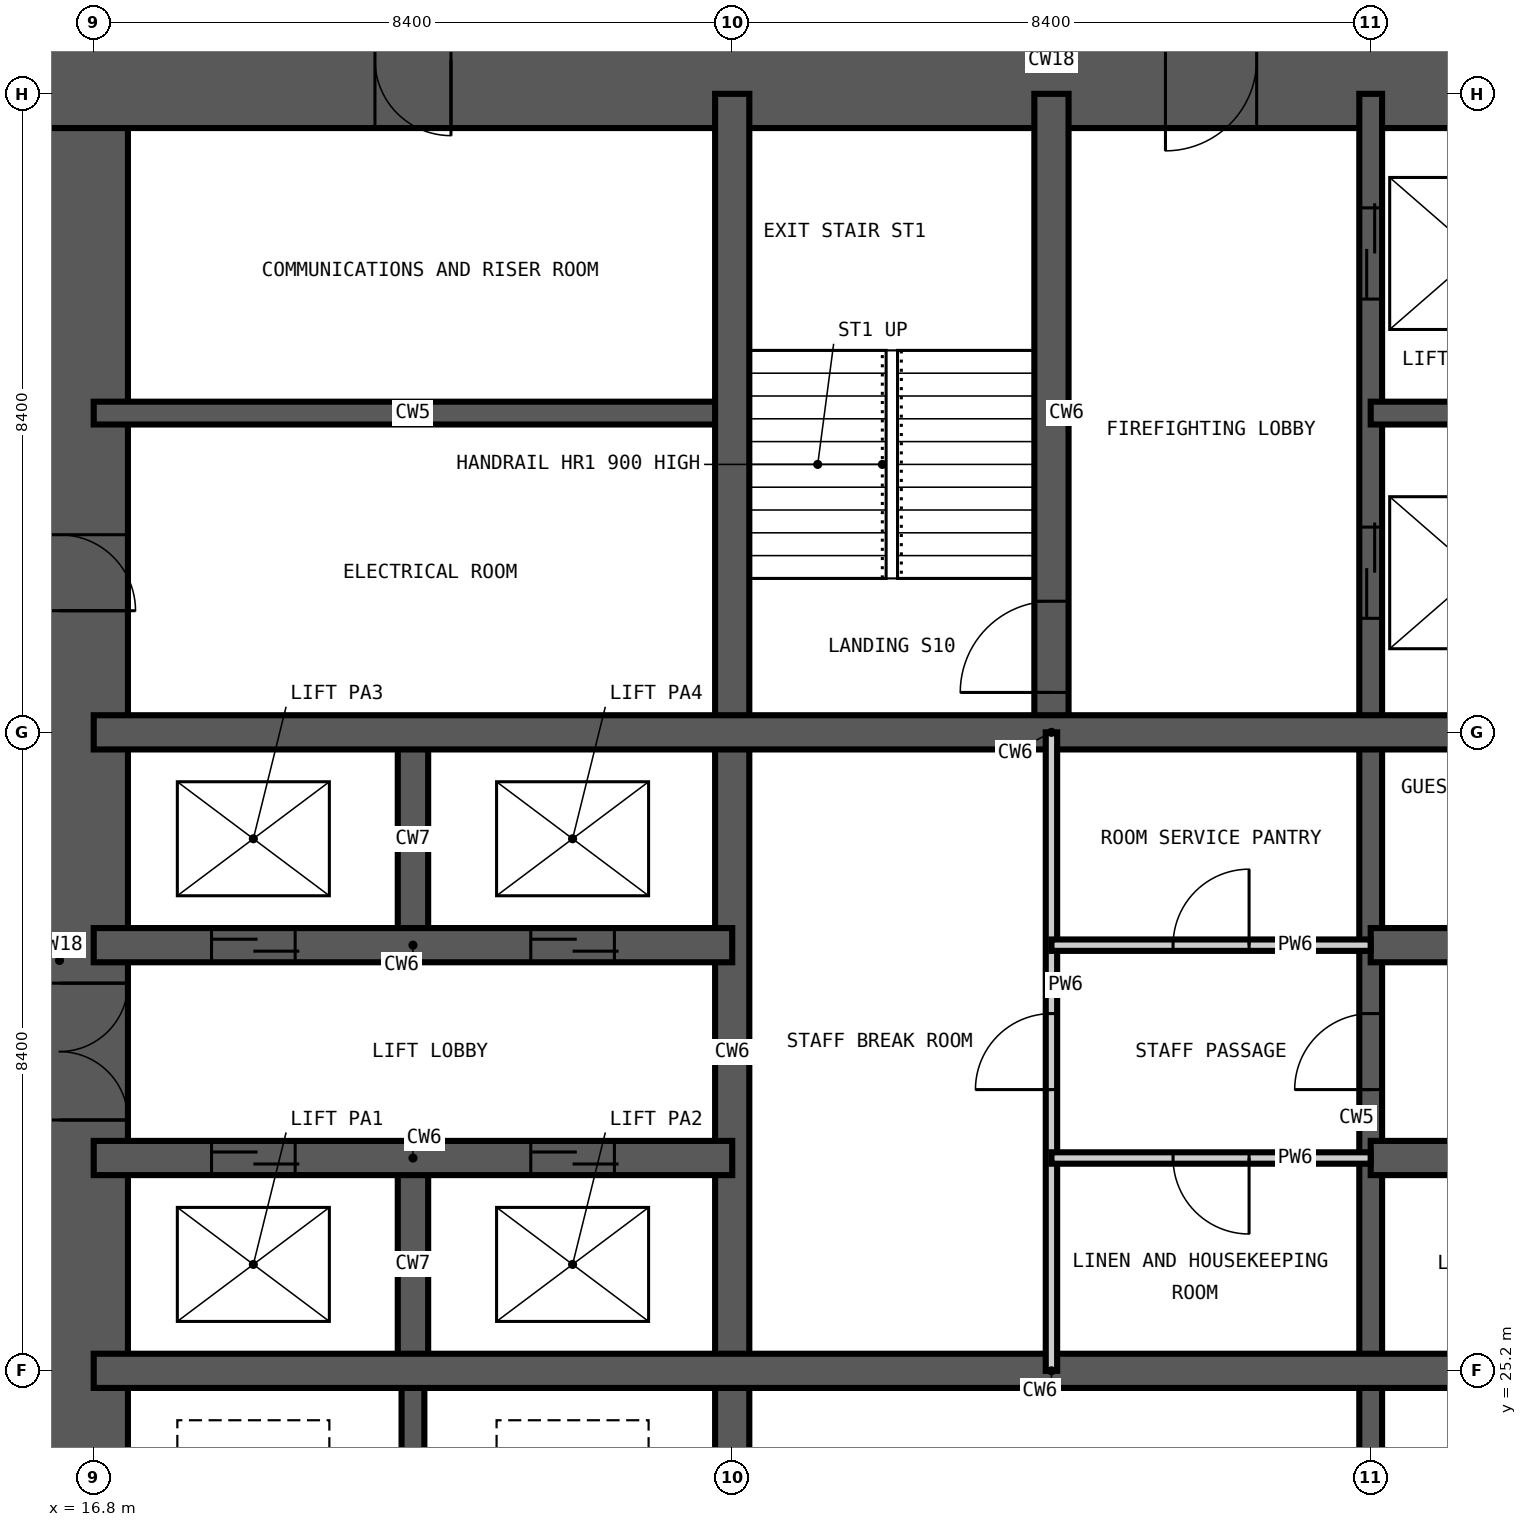
"""IFC4 building model, lengths in metres.
Left out: names, types, materials, properties, quantities, classifications, styles, units other than length and angle.
Written with IfcOpenShell. Run it as: python <this file> out.ifc"""

import sys

from ifc_helpers import new_model, si_unit, direction, frame, frame_2d, origin, place, context, subcontext, project, spatial, rectangle, extrude, element, fill, save


model = new_model("IFC4")
c1 = context("Model", 3, precision=1e-05, world=origin(), true_north=direction((0.0, 1.0)))
c2 = subcontext(c1, "Body", "Model", "MODEL_VIEW")
j1 = project(units=[si_unit("LENGTHUNIT", "METRE"), si_unit("PLANEANGLEUNIT", "RADIAN")], contexts=[c1])
p1 = place(None, origin())
s1 = spatial("IfcSite", under=j1, at=p1, CompositionType="ELEMENT")
p2 = place(p1, origin())
s2 = spatial("IfcBuilding", under=s1, at=p2, CompositionType="ELEMENT")
p3 = place(p2, frame((0.0, 0.0, 34.2)))
s3 = spatial("IfcBuildingStorey", under=s2, at=p3, CompositionType="ELEMENT", Elevation=34.2)
p4 = place(p3, frame((43.35, 42.45, -0.35), z_axis=(0.0, 0.0, 1.0), x_axis=(-1.0, 0.0, 0.0)))
e1 = element("IfcWall", 1, at=p4, inside=s3, PredefinedType="SHEAR", context=c2, shape_type="SweptSolid", body=[
    extrude(rectangle(XDim=27.9, YDim=1.8, at=frame_2d((13.95, 0.0))), origin(), (0.0, 0.0, 1.0), 3.6),
])
p5 = place(p4, frame((21.85, 0.0, 0.35)))
e2 = element("IfcOpeningElement", 2, at=p5, cuts=e1, PredefinedType="OPENING", context=c2, shape_type="SweptSolid", body=[
    extrude(rectangle(XDim=1.0, YDim=2.1, at=frame_2d((0.5, 1.05))), frame((0.0, 0.91, 0.0), z_axis=(0.0, -1.0, 0.0), x_axis=(1.0, 0.0, 0.0)), (0.0, 0.0, 1.0), 1.82),
])
p6 = place(p4, frame((11.25, 0.0, 0.35)))
e3 = element("IfcOpeningElement", 3, at=p6, cuts=e1, PredefinedType="OPENING", context=c2, shape_type="SweptSolid", body=[
    extrude(rectangle(XDim=1.2, YDim=2.2, at=frame_2d((0.6, 1.1))), frame((0.0, 0.91, 0.0), z_axis=(0.0, -1.0, 0.0), x_axis=(1.0, 0.0, 0.0)), (0.0, 0.0, 1.0), 1.82),
])
p7 = place(p3, frame((16.35, 41.55, -0.35), z_axis=(0.0, 0.0, 1.0), x_axis=(0.0, -1.0, 0.0)))
e4 = element("IfcWall", 4, at=p7, inside=s3, PredefinedType="SHEAR", context=c2, shape_type="SweptSolid", body=[
    extrude(rectangle(XDim=24.3, YDim=1.8, at=frame_2d((12.15, 0.0))), origin(), (0.0, 0.0, 1.0), 3.6),
])
p8 = place(p7, frame((11.25, 0.0, 0.35)))
e5 = element("IfcOpeningElement", 5, at=p8, cuts=e4, PredefinedType="OPENING", context=c2, shape_type="SweptSolid", body=[
    extrude(rectangle(XDim=1.8, YDim=2.2, at=frame_2d((0.9, 1.1))), frame((0.0, 0.91, 0.0), z_axis=(0.0, -1.0, 0.0), x_axis=(1.0, 0.0, 0.0)), (0.0, 0.0, 1.0), 1.82),
])
p9 = place(p7, frame((20.05, 0.0, 0.35)))
e6 = element("IfcOpeningElement", 6, at=p9, cuts=e4, PredefinedType="OPENING", context=c2, shape_type="SweptSolid", body=[
    extrude(rectangle(XDim=1.0, YDim=2.1, at=frame_2d((0.5, 1.05))), frame((0.0, 0.91, 0.0), z_axis=(0.0, -1.0, 0.0), x_axis=(1.0, 0.0, 0.0)), (0.0, 0.0, 1.0), 1.82),
])
p10 = place(p7, frame((5.35, 0.0, 0.35)))
e7 = element("IfcOpeningElement", 7, at=p10, cuts=e4, PredefinedType="OPENING", context=c2, shape_type="SweptSolid", body=[
    extrude(rectangle(XDim=1.0, YDim=2.1, at=frame_2d((0.5, 1.05))), frame((0.0, 0.91, 0.0), z_axis=(0.0, -1.0, 0.0), x_axis=(1.0, 0.0, 0.0)), (0.0, 0.0, 1.0), 1.82),
])
p11 = place(p3, frame((21.0, 22.4, -0.35), z_axis=(0.0, 0.0, 1.0), x_axis=(0.0, 1.0, 0.0)))
e8 = element("IfcWall", 8, at=p11, inside=s3, PredefinedType="SHEAR", context=c2, shape_type="SweptSolid", body=[
    extrude(rectangle(XDim=2.8, YDim=0.3, at=frame_2d((1.4, 0.0))), origin(), (0.0, 0.0, 1.0), 3.6),
])
p12 = place(p3, frame((33.6, 16.8, -0.35), z_axis=(0.0, 0.0, 1.0), x_axis=(0.0, 1.0, 0.0)))
e9 = element("IfcWall", 9, at=p12, inside=s3, PredefinedType="SHEAR", context=c2, shape_type="SweptSolid", body=[
    extrude(rectangle(XDim=25.2, YDim=0.3, at=frame_2d((12.6, 0.0))), origin(), (0.0, 0.0, 1.0), 3.6),
])
p13 = place(p12, frame((22.5, 0.0, 0.35)))
e10 = element("IfcOpeningElement", 10, at=p13, cuts=e9, PredefinedType="OPENING", context=c2, shape_type="SweptSolid", body=[
    extrude(rectangle(XDim=1.2, YDim=2.2, at=frame_2d((0.6, 1.1))), frame((0.0, 0.16, 0.0), z_axis=(0.0, -1.0, 0.0), x_axis=(1.0, 0.0, 0.0)), (0.0, 0.0, 1.0), 0.32),
])
p14 = place(p12, frame((18.3, 0.0, 0.35)))
e11 = element("IfcOpeningElement", 11, at=p14, cuts=e9, PredefinedType="OPENING", context=c2, shape_type="SweptSolid", body=[
    extrude(rectangle(XDim=1.2, YDim=2.2, at=frame_2d((0.6, 1.1))), frame((0.0, 0.16, 0.0), z_axis=(0.0, -1.0, 0.0), x_axis=(1.0, 0.0, 0.0)), (0.0, 0.0, 1.0), 0.32),
])
p15 = place(p12, frame((12.1, 0.0, 0.35)))
e12 = element("IfcOpeningElement", 12, at=p15, cuts=e9, PredefinedType="OPENING", context=c2, shape_type="SweptSolid", body=[
    extrude(rectangle(XDim=1.0, YDim=2.1, at=frame_2d((0.5, 1.05))), frame((0.0, 0.16, 0.0), z_axis=(0.0, -1.0, 0.0), x_axis=(1.0, 0.0, 0.0)), (0.0, 0.0, 1.0), 0.32),
])
p16 = place(p3, frame((16.8, 37.8, -0.35), z_axis=(0.0, 0.0, 1.0), x_axis=(1.0, 0.0, 0.0)))
e13 = element("IfcWall", 13, at=p16, inside=s3, PredefinedType="SHEAR", context=c2, shape_type="SweptSolid", body=[
    extrude(rectangle(XDim=8.4, YDim=0.3, at=frame_2d((4.2, 0.0))), origin(), (0.0, 0.0, 1.0), 3.6),
])
p17 = place(p3, frame((33.6, 37.8, -0.35), z_axis=(0.0, 0.0, 1.0), x_axis=(1.0, 0.0, 0.0)))
e14 = element("IfcWall", 14, at=p17, inside=s3, PredefinedType="SHEAR", context=c2, shape_type="SweptSolid", body=[
    extrude(rectangle(XDim=2.8, YDim=0.3, at=frame_2d((1.4, 0.0))), origin(), (0.0, 0.0, 1.0), 3.6),
])
for number, where, z_axis, x_axis in (
    (15, (21.0, 25.2, -0.35), (0.0, 0.0, 1.0), (0.0, 1.0, 0.0)),
    (16, (21.0, 30.8, -0.35), (0.0, 0.0, 1.0), (0.0, 1.0, 0.0)),
):
    element("IfcWall", number, at=place(p3, frame(where, z_axis=z_axis, x_axis=x_axis)), inside=s3, PredefinedType="SHEAR", context=c2, shape_type="SweptSolid", body=[
        extrude(rectangle(XDim=2.8, YDim=0.4, at=frame_2d((1.4, 0.0))), origin(), (0.0, 0.0, 1.0), 3.6),
    ])
p18 = place(p3, frame((25.2, 16.8, -0.35), z_axis=(0.0, 0.0, 1.0), x_axis=(0.0, 1.0, 0.0)))
e17 = element("IfcWall", 17, at=p18, inside=s3, PredefinedType="SHEAR", context=c2, shape_type="SweptSolid", body=[
    extrude(rectangle(XDim=25.2, YDim=0.45, at=frame_2d((12.6, 0.0))), origin(), (0.0, 0.0, 1.0), 3.6),
])
p19 = place(p3, frame((29.4, 33.6, -0.35), z_axis=(0.0, 0.0, 1.0), x_axis=(0.0, 1.0, 0.0)))
e18 = element("IfcWall", 18, at=p19, inside=s3, PredefinedType="SHEAR", context=c2, shape_type="SweptSolid", body=[
    extrude(rectangle(XDim=8.4, YDim=0.45, at=frame_2d((4.2, 0.0))), origin(), (0.0, 0.0, 1.0), 3.6),
])
p20 = place(p19, frame((0.525, 0.0, 0.35)))
e19 = element("IfcOpeningElement", 19, at=p20, cuts=e18, PredefinedType="OPENING", context=c2, shape_type="SweptSolid", body=[
    extrude(rectangle(XDim=1.2, YDim=2.2, at=frame_2d((0.6, 1.1))), frame((0.0, 0.235, 0.0), z_axis=(0.0, -1.0, 0.0), x_axis=(1.0, 0.0, 0.0)), (0.0, 0.0, 1.0), 0.47),
])
p21 = place(p3, frame((16.8, 25.2, -0.35), z_axis=(0.0, 0.0, 1.0), x_axis=(1.0, 0.0, 0.0)))
e20 = element("IfcWall", 20, at=p21, inside=s3, PredefinedType="SHEAR", context=c2, shape_type="SweptSolid", body=[
    extrude(rectangle(XDim=25.2, YDim=0.45, at=frame_2d((12.6, 0.0))), origin(), (0.0, 0.0, 1.0), 3.6),
])
p22 = place(p3, frame((16.8, 28.0, -0.35), z_axis=(0.0, 0.0, 1.0), x_axis=(1.0, 0.0, 0.0)))
e21 = element("IfcWall", 21, at=p22, inside=s3, PredefinedType="SHEAR", context=c2, shape_type="SweptSolid", body=[
    extrude(rectangle(XDim=8.4, YDim=0.45, at=frame_2d((4.2, 0.0))), origin(), (0.0, 0.0, 1.0), 3.6),
])
p23 = place(p22, frame((1.55, 0.0, 0.35)))
e22 = element("IfcOpeningElement", 22, at=p23, cuts=e21, PredefinedType="OPENING", context=c2, shape_type="SweptSolid", body=[
    extrude(rectangle(XDim=1.1, YDim=2.2, at=frame_2d((0.55, 1.1))), frame((0.0, 0.235, 0.0), z_axis=(0.0, -1.0, 0.0), x_axis=(1.0, 0.0, 0.0)), (0.0, 0.0, 1.0), 0.47),
])
p24 = place(p22, frame((5.75, 0.0, 0.35)))
e23 = element("IfcOpeningElement", 23, at=p24, cuts=e21, PredefinedType="OPENING", context=c2, shape_type="SweptSolid", body=[
    extrude(rectangle(XDim=1.1, YDim=2.2, at=frame_2d((0.55, 1.1))), frame((0.0, 0.235, 0.0), z_axis=(0.0, -1.0, 0.0), x_axis=(1.0, 0.0, 0.0)), (0.0, 0.0, 1.0), 0.47),
])
p25 = place(p3, frame((33.6, 28.0, -0.35), z_axis=(0.0, 0.0, 1.0), x_axis=(1.0, 0.0, 0.0)))
e24 = element("IfcWall", 24, at=p25, inside=s3, PredefinedType="SHEAR", context=c2, shape_type="SweptSolid", body=[
    extrude(rectangle(XDim=8.4, YDim=0.45, at=frame_2d((4.2, 0.0))), origin(), (0.0, 0.0, 1.0), 3.6),
])
p26 = place(p3, frame((16.8, 30.8, -0.35), z_axis=(0.0, 0.0, 1.0), x_axis=(1.0, 0.0, 0.0)))
e25 = element("IfcWall", 25, at=p26, inside=s3, PredefinedType="SHEAR", context=c2, shape_type="SweptSolid", body=[
    extrude(rectangle(XDim=8.4, YDim=0.45, at=frame_2d((4.2, 0.0))), origin(), (0.0, 0.0, 1.0), 3.6),
])
p27 = place(p26, frame((1.55, 0.0, 0.35)))
e26 = element("IfcOpeningElement", 26, at=p27, cuts=e25, PredefinedType="OPENING", context=c2, shape_type="SweptSolid", body=[
    extrude(rectangle(XDim=1.1, YDim=2.2, at=frame_2d((0.55, 1.1))), frame((0.0, 0.235, 0.0), z_axis=(0.0, -1.0, 0.0), x_axis=(1.0, 0.0, 0.0)), (0.0, 0.0, 1.0), 0.47),
])
p28 = place(p26, frame((5.75, 0.0, 0.35)))
e27 = element("IfcOpeningElement", 27, at=p28, cuts=e25, PredefinedType="OPENING", context=c2, shape_type="SweptSolid", body=[
    extrude(rectangle(XDim=1.1, YDim=2.2, at=frame_2d((0.55, 1.1))), frame((0.0, 0.235, 0.0), z_axis=(0.0, -1.0, 0.0), x_axis=(1.0, 0.0, 0.0)), (0.0, 0.0, 1.0), 0.47),
])
p29 = place(p3, frame((33.6, 30.8, -0.35), z_axis=(0.0, 0.0, 1.0), x_axis=(1.0, 0.0, 0.0)))
e28 = element("IfcWall", 28, at=p29, inside=s3, PredefinedType="SHEAR", context=c2, shape_type="SweptSolid", body=[
    extrude(rectangle(XDim=8.4, YDim=0.45, at=frame_2d((4.2, 0.0))), origin(), (0.0, 0.0, 1.0), 3.6),
])
p30 = place(p29, frame((1.6, 0.0, 0.35)))
e29 = element("IfcOpeningElement", 29, at=p30, cuts=e28, PredefinedType="OPENING", context=c2, shape_type="SweptSolid", body=[
    extrude(rectangle(XDim=1.0, YDim=2.1, at=frame_2d((0.5, 1.05))), frame((0.0, 0.235, 0.0), z_axis=(0.0, -1.0, 0.0), x_axis=(1.0, 0.0, 0.0)), (0.0, 0.0, 1.0), 0.47),
])
p31 = place(p29, frame((4.6, 0.0, 0.35)))
e30 = element("IfcOpeningElement", 30, at=p31, cuts=e28, PredefinedType="OPENING", context=c2, shape_type="SweptSolid", body=[
    extrude(rectangle(XDim=1.0, YDim=2.1, at=frame_2d((0.5, 1.05))), frame((0.0, 0.235, 0.0), z_axis=(0.0, -1.0, 0.0), x_axis=(1.0, 0.0, 0.0)), (0.0, 0.0, 1.0), 0.47),
])
p32 = place(p3, frame((16.8, 33.6, -0.35), z_axis=(0.0, 0.0, 1.0), x_axis=(1.0, 0.0, 0.0)))
e31 = element("IfcWall", 31, at=p32, inside=s3, PredefinedType="SHEAR", context=c2, shape_type="SweptSolid", body=[
    extrude(rectangle(XDim=25.2, YDim=0.45, at=frame_2d((12.6, 0.0))), origin(), (0.0, 0.0, 1.0), 3.6),
])
p33 = place(p3, frame((29.4, 25.2, 0.0), z_axis=(0.0, 0.0, 1.0), x_axis=(0.0, 1.0, 0.0)))
e32 = element("IfcWall", 32, at=p33, inside=s3, PredefinedType="PARTITIONING", context=c2, shape_type="SweptSolid", body=[
    extrude(rectangle(XDim=8.4, YDim=0.15, at=frame_2d((4.2, 0.0))), origin(), (0.0, 0.0, 1.0), 3.25),
])
p34 = place(p33, frame((3.7, 0.0, 0.0)))
e33 = element("IfcOpeningElement", 33, at=p34, cuts=e32, PredefinedType="OPENING", context=c2, shape_type="SweptSolid", body=[
    extrude(rectangle(XDim=1.0, YDim=2.1, at=frame_2d((0.5, 1.05))), frame((0.0, 0.085, 0.0), z_axis=(0.0, -1.0, 0.0), x_axis=(1.0, 0.0, 0.0)), (0.0, 0.0, 1.0), 0.17),
])
p35 = place(p3, frame((29.4, 28.0, 0.0), z_axis=(0.0, 0.0, 1.0), x_axis=(1.0, 0.0, 0.0)))
e34 = element("IfcWall", 34, at=p35, inside=s3, PredefinedType="PARTITIONING", context=c2, shape_type="SweptSolid", body=[
    extrude(rectangle(XDim=4.2, YDim=0.15, at=frame_2d((2.1, 0.0))), origin(), (0.0, 0.0, 1.0), 3.25),
])
p36 = place(p35, frame((1.6, 0.0, 0.0)))
e35 = element("IfcOpeningElement", 35, at=p36, cuts=e34, PredefinedType="OPENING", context=c2, shape_type="SweptSolid", body=[
    extrude(rectangle(XDim=1.0, YDim=2.1, at=frame_2d((0.5, 1.05))), frame((0.0, 0.085, 0.0), z_axis=(0.0, -1.0, 0.0), x_axis=(1.0, 0.0, 0.0)), (0.0, 0.0, 1.0), 0.17),
])
p37 = place(p3, frame((29.4, 30.8, 0.0), z_axis=(0.0, 0.0, 1.0), x_axis=(1.0, 0.0, 0.0)))
e36 = element("IfcWall", 36, at=p37, inside=s3, PredefinedType="PARTITIONING", context=c2, shape_type="SweptSolid", body=[
    extrude(rectangle(XDim=4.2, YDim=0.15, at=frame_2d((2.1, 0.0))), origin(), (0.0, 0.0, 1.0), 3.25),
])
p38 = place(p37, frame((1.6, 0.0, 0.0)))
e37 = element("IfcOpeningElement", 37, at=p38, cuts=e36, PredefinedType="OPENING", context=c2, shape_type="SweptSolid", body=[
    extrude(rectangle(XDim=1.0, YDim=2.1, at=frame_2d((0.5, 1.05))), frame((0.0, 0.085, 0.0), z_axis=(0.0, -1.0, 0.0), x_axis=(1.0, 0.0, 0.0)), (0.0, 0.0, 1.0), 0.17),
])
p39 = place(p20, origin())
e38 = element("IfcDoor", 38, at=p39, inside=s3, OperationType="SINGLE_SWING_LEFT", PredefinedType="DOOR", context=c2, shape_type="SweptSolid", body=[
    extrude(rectangle(XDim=1.2, YDim=2.2, at=frame_2d((0.6, 1.1))), frame((0.0, 0.025, 0.0), z_axis=(0.0, -1.0, 0.0), x_axis=(1.0, 0.0, 0.0)), (0.0, 0.0, 1.0), 0.05),
])
fill(e19, e38)
p40 = place(p23, origin())
e39 = element("IfcDoor", 39, at=p40, inside=s3, OperationType="DOUBLE_DOOR_SLIDING", PredefinedType="DOOR", context=c2, shape_type="SweptSolid", body=[
    extrude(rectangle(XDim=1.1, YDim=2.2, at=frame_2d((0.55, 1.1))), frame((0.0, 0.025, 0.0), z_axis=(0.0, -1.0, 0.0), x_axis=(1.0, 0.0, 0.0)), (0.0, 0.0, 1.0), 0.05),
])
fill(e22, e39)
p41 = place(p24, origin())
e40 = element("IfcDoor", 40, at=p41, inside=s3, OperationType="DOUBLE_DOOR_SLIDING", PredefinedType="DOOR", context=c2, shape_type="SweptSolid", body=[
    extrude(rectangle(XDim=1.1, YDim=2.2, at=frame_2d((0.55, 1.1))), frame((0.0, 0.025, 0.0), z_axis=(0.0, -1.0, 0.0), x_axis=(1.0, 0.0, 0.0)), (0.0, 0.0, 1.0), 0.05),
])
fill(e23, e40)
p42 = place(p27, origin())
e41 = element("IfcDoor", 41, at=p42, inside=s3, OperationType="DOUBLE_DOOR_SLIDING", PredefinedType="DOOR", context=c2, shape_type="SweptSolid", body=[
    extrude(rectangle(XDim=1.1, YDim=2.2, at=frame_2d((0.55, 1.1))), frame((0.0, 0.025, 0.0), z_axis=(0.0, -1.0, 0.0), x_axis=(1.0, 0.0, 0.0)), (0.0, 0.0, 1.0), 0.05),
])
fill(e26, e41)
p43 = place(p28, origin())
e42 = element("IfcDoor", 42, at=p43, inside=s3, OperationType="DOUBLE_DOOR_SLIDING", PredefinedType="DOOR", context=c2, shape_type="SweptSolid", body=[
    extrude(rectangle(XDim=1.1, YDim=2.2, at=frame_2d((0.55, 1.1))), frame((0.0, 0.025, 0.0), z_axis=(0.0, -1.0, 0.0), x_axis=(1.0, 0.0, 0.0)), (0.0, 0.0, 1.0), 0.05),
])
fill(e27, e42)
p44 = place(p13, origin())
e43 = element("IfcDoor", 43, at=p44, inside=s3, OperationType="DOUBLE_DOOR_SLIDING", PredefinedType="DOOR", context=c2, shape_type="SweptSolid", body=[
    extrude(rectangle(XDim=1.2, YDim=2.2, at=frame_2d((0.6, 1.1))), frame((0.0, 0.025, 0.0), z_axis=(0.0, -1.0, 0.0), x_axis=(1.0, 0.0, 0.0)), (0.0, 0.0, 1.0), 0.05),
])
fill(e10, e43)
p45 = place(p14, origin())
e44 = element("IfcDoor", 44, at=p45, inside=s3, OperationType="DOUBLE_DOOR_SLIDING", PredefinedType="DOOR", context=c2, shape_type="SweptSolid", body=[
    extrude(rectangle(XDim=1.2, YDim=2.2, at=frame_2d((0.6, 1.1))), frame((0.0, 0.025, 0.0), z_axis=(0.0, -1.0, 0.0), x_axis=(1.0, 0.0, 0.0)), (0.0, 0.0, 1.0), 0.05),
])
fill(e11, e44)
p46 = place(p8, origin())
e45 = element("IfcDoor", 45, at=p46, inside=s3, OperationType="DOUBLE_DOOR_DOUBLE_SWING", PredefinedType="DOOR", context=c2, shape_type="SweptSolid", body=[
    extrude(rectangle(XDim=1.8, YDim=2.2, at=frame_2d((0.9, 1.1))), frame((0.0, 0.025, 0.0), z_axis=(0.0, -1.0, 0.0), x_axis=(1.0, 0.0, 0.0)), (0.0, 0.0, 1.0), 0.05),
])
fill(e5, e45)
p47 = place(p10, origin())
e46 = element("IfcDoor", 46, at=p47, inside=s3, OperationType="SINGLE_SWING_RIGHT", PredefinedType="DOOR", context=c2, shape_type="SweptSolid", body=[
    extrude(rectangle(XDim=1.0, YDim=2.1, at=frame_2d((0.5, 1.05))), frame((0.0, 0.025, 0.0), z_axis=(0.0, -1.0, 0.0), x_axis=(1.0, 0.0, 0.0)), (0.0, 0.0, 1.0), 0.05),
])
fill(e7, e46)
p48 = place(p5, origin())
e47 = element("IfcDoor", 47, at=p48, inside=s3, OperationType="SINGLE_SWING_LEFT", PredefinedType="DOOR", context=c2, shape_type="SweptSolid", body=[
    extrude(rectangle(XDim=1.0, YDim=2.1, at=frame_2d((0.5, 1.05))), frame((0.0, 0.025, 0.0), z_axis=(0.0, -1.0, 0.0), x_axis=(1.0, 0.0, 0.0)), (0.0, 0.0, 1.0), 0.05),
])
fill(e2, e47)
p49 = place(p15, origin())
e48 = element("IfcDoor", 48, at=p49, inside=s3, OperationType="SINGLE_SWING_LEFT", PredefinedType="DOOR", context=c2, shape_type="SweptSolid", body=[
    extrude(rectangle(XDim=1.0, YDim=2.1, at=frame_2d((0.5, 1.05))), frame((0.0, 0.025, 0.0), z_axis=(0.0, -1.0, 0.0), x_axis=(1.0, 0.0, 0.0)), (0.0, 0.0, 1.0), 0.05),
])
fill(e12, e48)
p50 = place(p36, frame((1.0, 0.0, 0.0), z_axis=(0.0, 0.0, 1.0), x_axis=(-1.0, 0.0, 0.0)))
e49 = element("IfcDoor", 49, at=p50, inside=s3, OperationType="SINGLE_SWING_LEFT", PredefinedType="DOOR", context=c2, shape_type="SweptSolid", body=[
    extrude(rectangle(XDim=1.0, YDim=2.1, at=frame_2d((0.5, 1.05))), frame((0.0, 0.025, 0.0), z_axis=(0.0, -1.0, 0.0), x_axis=(1.0, 0.0, 0.0)), (0.0, 0.0, 1.0), 0.05),
])
fill(e35, e49)
p51 = place(p38, origin())
e50 = element("IfcDoor", 50, at=p51, inside=s3, OperationType="SINGLE_SWING_RIGHT", PredefinedType="DOOR", context=c2, shape_type="SweptSolid", body=[
    extrude(rectangle(XDim=1.0, YDim=2.1, at=frame_2d((0.5, 1.05))), frame((0.0, 0.025, 0.0), z_axis=(0.0, -1.0, 0.0), x_axis=(1.0, 0.0, 0.0)), (0.0, 0.0, 1.0), 0.05),
])
fill(e37, e50)
p52 = place(p34, origin())
e51 = element("IfcDoor", 51, at=p52, inside=s3, OperationType="SINGLE_SWING_LEFT", PredefinedType="DOOR", context=c2, shape_type="SweptSolid", body=[
    extrude(rectangle(XDim=1.0, YDim=2.1, at=frame_2d((0.5, 1.05))), frame((0.0, 0.025, 0.0), z_axis=(0.0, -1.0, 0.0), x_axis=(1.0, 0.0, 0.0)), (0.0, 0.0, 1.0), 0.05),
])
fill(e33, e51)
p53 = place(p6, origin())
e52 = element("IfcDoor", 52, at=p53, inside=s3, OperationType="SINGLE_SWING_RIGHT", PredefinedType="DOOR", context=c2, shape_type="SweptSolid", body=[
    extrude(rectangle(XDim=1.2, YDim=2.2, at=frame_2d((0.6, 1.1))), frame((0.0, 0.025, 0.0), z_axis=(0.0, -1.0, 0.0), x_axis=(1.0, 0.0, 0.0)), (0.0, 0.0, 1.0), 0.05),
])
fill(e3, e52)
save(model, sys.argv[1])
